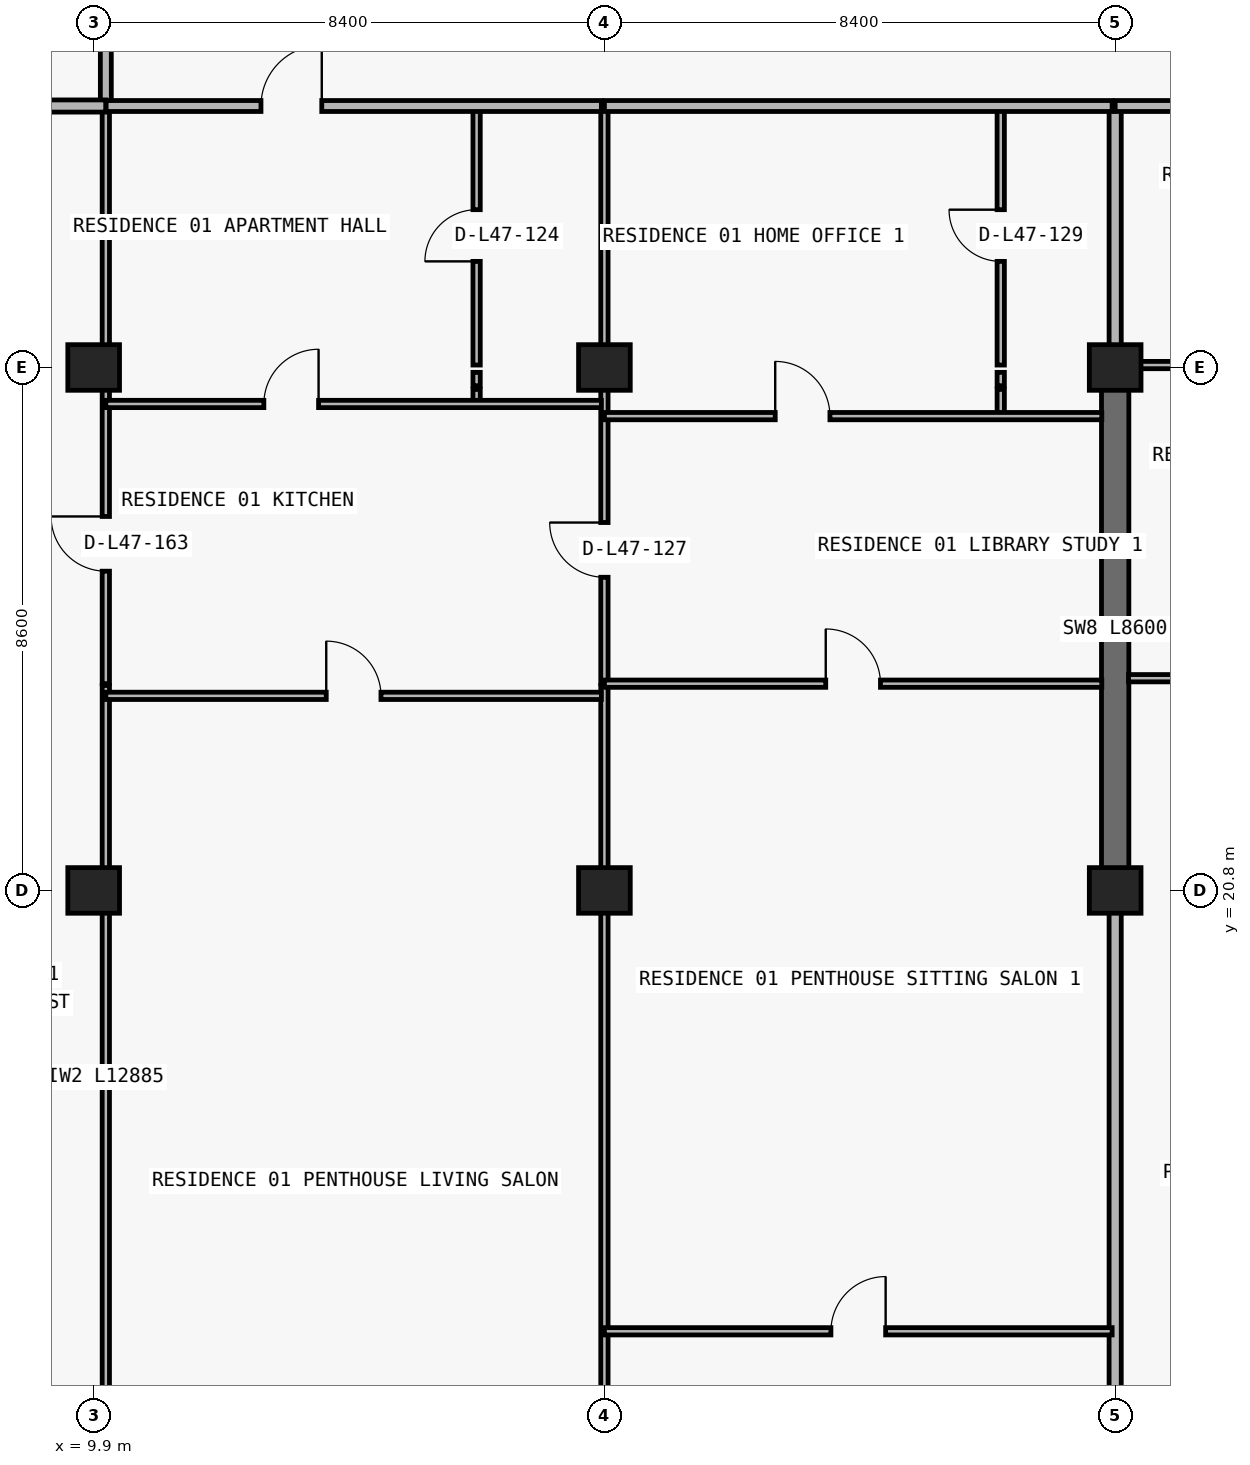
"""IFC4 building model, lengths in metres.
Left out: names, types, materials, properties, quantities, classifications, styles, units other than length and angle.
Written with IfcOpenShell. Run it as: python <this file> out.ifc"""

import sys

from ifc_helpers import new_model, si_unit, direction, frame, frame_2d, origin, origin_2d, place, context, subcontext, project, spatial, rectangle, extrude, element, fill, save


model = new_model("IFC4")
c1 = context("Model", 3, precision=1e-05, world=origin(), true_north=direction((0.0, 1.0)))
c2 = subcontext(c1, "Body", "Model", "MODEL_VIEW")
j1 = project(units=[si_unit("LENGTHUNIT", "METRE"), si_unit("PLANEANGLEUNIT", "RADIAN")], contexts=[c1])
p1 = place(None, origin())
s1 = spatial("IfcSite", under=j1, at=p1, CompositionType="ELEMENT")
p2 = place(p1, origin())
s2 = spatial("IfcBuilding", under=s1, at=p2, CompositionType="ELEMENT")
p3 = place(p2, frame((0.0, 0.0, 170.4)))
s3 = spatial("IfcBuildingStorey", under=s2, at=p3, CompositionType="ELEMENT", Elevation=170.4)
for number, where, z_axis, x_axis in (
    (1, (9.9, 20.8, 0.0), (0.0, 0.0, 1.0), (1.0, 0.0, 0.0)),
    (2, (18.3, 20.8, 0.0), (0.0, 0.0, 1.0), (1.0, 0.0, 0.0)),
    (3, (26.7, 20.8, 0.0), (0.0, 0.0, 1.0), (1.0, 0.0, 0.0)),
    (4, (9.9, 29.4, 0.0), (0.0, 0.0, 1.0), (1.0, 0.0, 0.0)),
    (5, (18.3, 29.4, 0.0), (0.0, 0.0, 1.0), (1.0, 0.0, 0.0)),
    (6, (26.7, 29.4, 0.0), (0.0, 0.0, 1.0), (1.0, 0.0, 0.0)),
):
    element("IfcColumn", number, at=place(p3, frame(where, z_axis=z_axis, x_axis=x_axis)), inside=s3, PredefinedType="COLUMN", context=c2, shape_type="SweptSolid", body=[
        extrude(rectangle(XDim=0.85, YDim=0.75, at=origin_2d()), origin(), (0.0, 0.0, 1.0), 3.05),
    ])
p4 = place(p3, frame((26.7, 20.8, 0.0), z_axis=(0.0, 0.0, 1.0), x_axis=(0.0, 1.0, 0.0)))
e7 = element("IfcWall", 7, at=p4, inside=s3, PredefinedType="SHEAR", context=c2, shape_type="SweptSolid", body=[
    extrude(rectangle(XDim=8.6, YDim=0.45, at=frame_2d((4.3, 0.0))), origin(), (0.0, 0.0, 1.0), 3.05),
])
p5 = place(p3, frame((10.1, 11.285, 0.0), z_axis=(0.0, 0.0, 1.0), x_axis=(0.0, 1.0, 0.0)))
e8 = element("IfcWall", 8, at=p5, inside=s3, PredefinedType="PARTITIONING", context=c2, shape_type="SweptSolid", body=[
    extrude(rectangle(XDim=12.885, YDim=0.12, at=frame_2d((6.442, 0.0))), origin(), (0.0, 0.0, 1.0), 2.263),
])
p6 = place(p3, frame((10.1, 24.2, 0.0), z_axis=(0.0, 0.0, 1.0), x_axis=(0.0, 1.0, 0.0)))
e9 = element("IfcWall", 9, at=p6, inside=s3, PredefinedType="PARTITIONING", context=c2, shape_type="SweptSolid", body=[
    extrude(rectangle(XDim=4.84, YDim=0.12, at=frame_2d((2.42, 0.0))), origin(), (0.0, 0.0, 1.0), 2.263),
])
p7 = place(p6, frame((1.85, 0.0, 0.0)))
e10 = element("IfcOpeningElement", 10, at=p7, cuts=e9, PredefinedType="OPENING", context=c2, shape_type="SweptSolid", body=[
    extrude(rectangle(XDim=0.9, YDim=2.15, at=frame_2d((0.45, 1.075))), frame((0.0, 0.07, 0.0), z_axis=(0.0, -1.0, 0.0), x_axis=(1.0, 0.0, 0.0)), (0.0, 0.0, 1.0), 0.14),
])
p8 = place(p3, frame((10.1, 29.1, 0.0), z_axis=(0.0, 0.0, 1.0), x_axis=(0.0, 1.0, 0.0)))
e11 = element("IfcWall", 11, at=p8, inside=s3, PredefinedType="PARTITIONING", context=c2, shape_type="SweptSolid", body=[
    extrude(rectangle(XDim=0.22, YDim=0.12, at=frame_2d((0.11, 0.0))), origin(), (0.0, 0.0, 1.0), 3.05),
])
p9 = place(p3, frame((10.1, 29.44, 0.0), z_axis=(0.0, 0.0, 1.0), x_axis=(0.0, 1.0, 0.0)))
e12 = element("IfcWall", 12, at=p9, inside=s3, PredefinedType="PARTITIONING", context=c2, shape_type="SweptSolid", body=[
    extrude(rectangle(XDim=4.26, YDim=0.12, at=frame_2d((2.13, 0.0))), origin(), (0.0, 0.0, 1.0), 2.263),
])
p10 = place(p3, frame((10.1, 33.705, 0.0), z_axis=(0.0, 0.0, 1.0), x_axis=(0.0, 1.0, 0.0)))
e13 = element("IfcWall", 13, at=p10, inside=s3, PredefinedType="PARTITIONING", context=c2, shape_type="SweptSolid", body=[
    extrude(rectangle(XDim=3.245, YDim=0.18, at=frame_2d((1.623, 0.0))), origin(), (0.0, 0.0, 1.0), 2.263),
])
p11 = place(p3, frame((16.198, 28.8, 0.0), z_axis=(0.0, 0.0, 1.0), x_axis=(0.0, 1.0, 0.0)))
e14 = element("IfcWall", 14, at=p11, inside=s3, PredefinedType="PARTITIONING", context=c2, shape_type="SweptSolid", body=[
    extrude(rectangle(XDim=0.24, YDim=0.12, at=frame_2d((0.12, 0.0))), origin(), (0.0, 0.0, 1.0), 3.05),
])
p12 = place(p3, frame((16.198, 29.1, 0.0), z_axis=(0.0, 0.0, 1.0), x_axis=(0.0, 1.0, 0.0)))
e15 = element("IfcWall", 15, at=p12, inside=s3, PredefinedType="PARTITIONING", context=c2, shape_type="SweptSolid", body=[
    extrude(rectangle(XDim=0.22, YDim=0.12, at=frame_2d((0.11, 0.0))), origin(), (0.0, 0.0, 1.0), 3.05),
])
p13 = place(p3, frame((16.198, 29.44, 0.0), z_axis=(0.0, 0.0, 1.0), x_axis=(0.0, 1.0, 0.0)))
e16 = element("IfcWall", 16, at=p13, inside=s3, PredefinedType="PARTITIONING", context=c2, shape_type="SweptSolid", body=[
    extrude(rectangle(XDim=4.26, YDim=0.12, at=frame_2d((2.13, 0.0))), origin(), (0.0, 0.0, 1.0), 3.05),
])
p14 = place(p13, frame((1.705, 0.0, 0.0)))
e17 = element("IfcOpeningElement", 17, at=p14, cuts=e16, PredefinedType="OPENING", context=c2, shape_type="SweptSolid", body=[
    extrude(rectangle(XDim=0.85, YDim=2.1, at=frame_2d((0.425, 1.05))), frame((0.0, 0.07, 0.0), z_axis=(0.0, -1.0, 0.0), x_axis=(1.0, 0.0, 0.0)), (0.0, 0.0, 1.0), 0.14),
])
p15 = place(p3, frame((18.3, 11.24, 0.0), z_axis=(0.0, 0.0, 1.0), x_axis=(0.0, 1.0, 0.0)))
e18 = element("IfcWall", 18, at=p15, inside=s3, PredefinedType="PARTITIONING", context=c2, shape_type="SweptSolid", body=[
    extrude(rectangle(XDim=12.93, YDim=0.12, at=frame_2d((6.465, 0.0))), origin(), (0.0, 0.0, 1.0), 2.263),
])
p16 = place(p3, frame((18.3, 24.2, 0.0), z_axis=(0.0, 0.0, 1.0), x_axis=(0.0, 1.0, 0.0)))
e19 = element("IfcWall", 19, at=p16, inside=s3, PredefinedType="PARTITIONING", context=c2, shape_type="SweptSolid", body=[
    extrude(rectangle(XDim=4.84, YDim=0.12, at=frame_2d((2.42, 0.0))), origin(), (0.0, 0.0, 1.0), 2.263),
])
p17 = place(p16, frame((1.75, 0.0, 0.0)))
e20 = element("IfcOpeningElement", 20, at=p17, cuts=e19, PredefinedType="OPENING", context=c2, shape_type="SweptSolid", body=[
    extrude(rectangle(XDim=0.9, YDim=2.15, at=frame_2d((0.45, 1.075))), frame((0.0, 0.07, 0.0), z_axis=(0.0, -1.0, 0.0), x_axis=(1.0, 0.0, 0.0)), (0.0, 0.0, 1.0), 0.14),
])
p18 = place(p3, frame((18.3, 29.1, 0.0), z_axis=(0.0, 0.0, 1.0), x_axis=(0.0, 1.0, 0.0)))
e21 = element("IfcWall", 21, at=p18, inside=s3, PredefinedType="PARTITIONING", context=c2, shape_type="SweptSolid", body=[
    extrude(rectangle(XDim=0.22, YDim=0.12, at=frame_2d((0.11, 0.0))), origin(), (0.0, 0.0, 1.0), 3.05),
])
p19 = place(p3, frame((18.3, 29.44, 0.0), z_axis=(0.0, 0.0, 1.0), x_axis=(0.0, 1.0, 0.0)))
e22 = element("IfcWall", 22, at=p19, inside=s3, PredefinedType="PARTITIONING", context=c2, shape_type="SweptSolid", body=[
    extrude(rectangle(XDim=4.26, YDim=0.12, at=frame_2d((2.13, 0.0))), origin(), (0.0, 0.0, 1.0), 2.263),
])
p20 = place(p3, frame((24.818, 28.6, 0.0), z_axis=(0.0, 0.0, 1.0), x_axis=(0.0, 1.0, 0.0)))
e23 = element("IfcWall", 23, at=p20, inside=s3, PredefinedType="PARTITIONING", context=c2, shape_type="SweptSolid", body=[
    extrude(rectangle(XDim=0.44, YDim=0.12, at=frame_2d((0.22, 0.0))), origin(), (0.0, 0.0, 1.0), 3.05),
])
p21 = place(p3, frame((24.818, 29.1, 0.0), z_axis=(0.0, 0.0, 1.0), x_axis=(0.0, 1.0, 0.0)))
e24 = element("IfcWall", 24, at=p21, inside=s3, PredefinedType="PARTITIONING", context=c2, shape_type="SweptSolid", body=[
    extrude(rectangle(XDim=0.22, YDim=0.12, at=frame_2d((0.11, 0.0))), origin(), (0.0, 0.0, 1.0), 3.05),
])
p22 = place(p3, frame((24.818, 29.44, 0.0), z_axis=(0.0, 0.0, 1.0), x_axis=(0.0, 1.0, 0.0)))
e25 = element("IfcWall", 25, at=p22, inside=s3, PredefinedType="PARTITIONING", context=c2, shape_type="SweptSolid", body=[
    extrude(rectangle(XDim=4.26, YDim=0.12, at=frame_2d((2.13, 0.0))), origin(), (0.0, 0.0, 1.0), 3.05),
])
p23 = place(p22, frame((1.705, 0.0, 0.0)))
e26 = element("IfcOpeningElement", 26, at=p23, cuts=e25, PredefinedType="OPENING", context=c2, shape_type="SweptSolid", body=[
    extrude(rectangle(XDim=0.85, YDim=2.1, at=frame_2d((0.425, 1.05))), frame((0.0, 0.07, 0.0), z_axis=(0.0, -1.0, 0.0), x_axis=(1.0, 0.0, 0.0)), (0.0, 0.0, 1.0), 0.14),
])
p24 = place(p3, frame((26.7, 11.24, 0.0), z_axis=(0.0, 0.0, 1.0), x_axis=(0.0, 1.0, 0.0)))
e27 = element("IfcWall", 27, at=p24, inside=s3, PredefinedType="PARTITIONING", context=c2, shape_type="SweptSolid", body=[
    extrude(rectangle(XDim=9.555, YDim=0.2, at=frame_2d((4.777, 0.0))), origin(), (0.0, 0.0, 1.0), 2.263),
])
p25 = place(p3, frame((26.7, 29.44, 0.0), z_axis=(0.0, 0.0, 1.0), x_axis=(0.0, 1.0, 0.0)))
e28 = element("IfcWall", 28, at=p25, inside=s3, PredefinedType="PARTITIONING", context=c2, shape_type="SweptSolid", body=[
    extrude(rectangle(XDim=4.26, YDim=0.2, at=frame_2d((2.13, 0.0))), origin(), (0.0, 0.0, 1.0), 2.335),
])
p26 = place(p3, frame((18.3, 13.55, 0.0), z_axis=(0.0, 0.0, 1.0), x_axis=(1.0, 0.0, 0.0)))
e29 = element("IfcWall", 29, at=p26, inside=s3, PredefinedType="PARTITIONING", context=c2, shape_type="SweptSolid", body=[
    extrude(rectangle(XDim=8.35, YDim=0.12, at=frame_2d((4.175, 0.0))), origin(), (0.0, 0.0, 1.0), 3.05),
])
p27 = place(p26, frame((3.725, 0.0, 0.0)))
e30 = element("IfcOpeningElement", 30, at=p27, cuts=e29, PredefinedType="OPENING", context=c2, shape_type="SweptSolid", body=[
    extrude(rectangle(XDim=0.9, YDim=2.15, at=frame_2d((0.45, 1.075))), frame((0.0, 0.07, 0.0), z_axis=(0.0, -1.0, 0.0), x_axis=(1.0, 0.0, 0.0)), (0.0, 0.0, 1.0), 0.14),
])
p28 = place(p3, frame((10.1, 24.0, 0.0), z_axis=(0.0, 0.0, 1.0), x_axis=(1.0, 0.0, 0.0)))
e31 = element("IfcWall", 31, at=p28, inside=s3, PredefinedType="PARTITIONING", context=c2, shape_type="SweptSolid", body=[
    extrude(rectangle(XDim=8.15, YDim=0.12, at=frame_2d((4.075, 0.0))), origin(), (0.0, 0.0, 1.0), 3.05),
])
p29 = place(p28, frame((3.625, 0.0, 0.0)))
e32 = element("IfcOpeningElement", 32, at=p29, cuts=e31, PredefinedType="OPENING", context=c2, shape_type="SweptSolid", body=[
    extrude(rectangle(XDim=0.9, YDim=2.15, at=frame_2d((0.45, 1.075))), frame((0.0, 0.07, 0.0), z_axis=(0.0, -1.0, 0.0), x_axis=(1.0, 0.0, 0.0)), (0.0, 0.0, 1.0), 0.14),
])
p30 = place(p3, frame((18.3, 24.2, 0.0), z_axis=(0.0, 0.0, 1.0), x_axis=(1.0, 0.0, 0.0)))
e33 = element("IfcWall", 33, at=p30, inside=s3, PredefinedType="PARTITIONING", context=c2, shape_type="SweptSolid", body=[
    extrude(rectangle(XDim=8.18, YDim=0.12, at=frame_2d((4.09, 0.0))), origin(), (0.0, 0.0, 1.0), 3.05),
])
p31 = place(p30, frame((3.64, 0.0, 0.0)))
e34 = element("IfcOpeningElement", 34, at=p31, cuts=e33, PredefinedType="OPENING", context=c2, shape_type="SweptSolid", body=[
    extrude(rectangle(XDim=0.9, YDim=2.15, at=frame_2d((0.45, 1.075))), frame((0.0, 0.07, 0.0), z_axis=(0.0, -1.0, 0.0), x_axis=(1.0, 0.0, 0.0)), (0.0, 0.0, 1.0), 0.14),
])
p32 = place(p3, frame((26.92, 24.29, 0.0), z_axis=(0.0, 0.0, 1.0), x_axis=(1.0, 0.0, 0.0)))
e35 = element("IfcWall", 35, at=p32, inside=s3, PredefinedType="PARTITIONING", context=c2, shape_type="SweptSolid", body=[
    extrude(rectangle(XDim=4.4, YDim=0.12, at=frame_2d((2.2, 0.0))), origin(), (0.0, 0.0, 1.0), 3.05),
])
p33 = place(p32, frame((1.583, 0.0, 0.0)))
e36 = element("IfcOpeningElement", 36, at=p33, cuts=e35, PredefinedType="OPENING", context=c2, shape_type="SweptSolid", body=[
    extrude(rectangle(XDim=0.9, YDim=2.15, at=frame_2d((0.45, 1.075))), frame((0.0, 0.07, 0.0), z_axis=(0.0, -1.0, 0.0), x_axis=(1.0, 0.0, 0.0)), (0.0, 0.0, 1.0), 0.14),
])
p34 = place(p3, frame((18.3, 28.6, 0.0), z_axis=(0.0, 0.0, 1.0), x_axis=(1.0, 0.0, 0.0)))
e37 = element("IfcWall", 37, at=p34, inside=s3, PredefinedType="PARTITIONING", context=c2, shape_type="SweptSolid", body=[
    extrude(rectangle(XDim=8.18, YDim=0.12, at=frame_2d((4.09, 0.0))), origin(), (0.0, 0.0, 1.0), 3.05),
])
p35 = place(p34, frame((2.809, 0.0, 0.0)))
e38 = element("IfcOpeningElement", 38, at=p35, cuts=e37, PredefinedType="OPENING", context=c2, shape_type="SweptSolid", body=[
    extrude(rectangle(XDim=0.9, YDim=2.15, at=frame_2d((0.45, 1.075))), frame((0.0, 0.07, 0.0), z_axis=(0.0, -1.0, 0.0), x_axis=(1.0, 0.0, 0.0)), (0.0, 0.0, 1.0), 0.14),
])
p36 = place(p3, frame((10.1, 28.8, 0.0), z_axis=(0.0, 0.0, 1.0), x_axis=(1.0, 0.0, 0.0)))
e39 = element("IfcWall", 39, at=p36, inside=s3, PredefinedType="PARTITIONING", context=c2, shape_type="SweptSolid", body=[
    extrude(rectangle(XDim=8.15, YDim=0.12, at=frame_2d((4.075, 0.0))), origin(), (0.0, 0.0, 1.0), 3.05),
])
p37 = place(p36, frame((2.599, 0.0, 0.0)))
e40 = element("IfcOpeningElement", 40, at=p37, cuts=e39, PredefinedType="OPENING", context=c2, shape_type="SweptSolid", body=[
    extrude(rectangle(XDim=0.9, YDim=2.15, at=frame_2d((0.45, 1.075))), frame((0.0, 0.07, 0.0), z_axis=(0.0, -1.0, 0.0), x_axis=(1.0, 0.0, 0.0)), (0.0, 0.0, 1.0), 0.14),
])
p38 = place(p3, frame((26.92, 29.44, 0.0), z_axis=(0.0, 0.0, 1.0), x_axis=(1.0, 0.0, 0.0)))
e41 = element("IfcWall", 41, at=p38, inside=s3, PredefinedType="PARTITIONING", context=c2, shape_type="SweptSolid", body=[
    extrude(rectangle(XDim=4.4, YDim=0.12, at=frame_2d((2.2, 0.0))), origin(), (0.0, 0.0, 1.0), 2.263),
])
p39 = place(p38, frame((1.583, 0.0, 0.0)))
e42 = element("IfcOpeningElement", 42, at=p39, cuts=e41, PredefinedType="OPENING", context=c2, shape_type="SweptSolid", body=[
    extrude(rectangle(XDim=0.9, YDim=2.15, at=frame_2d((0.45, 1.075))), frame((0.0, 0.07, 0.0), z_axis=(0.0, -1.0, 0.0), x_axis=(1.0, 0.0, 0.0)), (0.0, 0.0, 1.0), 0.14),
])
p40 = place(p3, frame((6.395, 33.7, 0.0), z_axis=(0.0, 0.0, 1.0), x_axis=(1.0, 0.0, 0.0)))
e43 = element("IfcWall", 43, at=p40, inside=s3, PredefinedType="PARTITIONING", context=c2, shape_type="SweptSolid", body=[
    extrude(rectangle(XDim=3.705, YDim=0.2, at=frame_2d((1.853, 0.0))), origin(), (0.0, 0.0, 1.0), 3.05),
])
p41 = place(p3, frame((10.105, 33.7, 0.0), z_axis=(0.0, 0.0, 1.0), x_axis=(1.0, 0.0, 0.0)))
e44 = element("IfcWall", 44, at=p41, inside=s3, PredefinedType="PARTITIONING", context=c2, shape_type="SweptSolid", body=[
    extrude(rectangle(XDim=8.145, YDim=0.18, at=frame_2d((4.073, 0.0))), origin(), (0.0, 0.0, 1.0), 3.05),
])
p42 = place(p41, frame((2.546, 0.0, 0.0)))
e45 = element("IfcOpeningElement", 45, at=p42, cuts=e44, PredefinedType="OPENING", context=c2, shape_type="SweptSolid", body=[
    extrude(rectangle(XDim=1.0, YDim=2.2, at=frame_2d((0.5, 1.1))), frame((0.0, 0.1, 0.0), z_axis=(0.0, -1.0, 0.0), x_axis=(1.0, 0.0, 0.0)), (0.0, 0.0, 1.0), 0.2),
])
p43 = place(p3, frame((18.3, 33.7, 0.0), z_axis=(0.0, 0.0, 1.0), x_axis=(1.0, 0.0, 0.0)))
e46 = element("IfcWall", 46, at=p43, inside=s3, PredefinedType="PARTITIONING", context=c2, shape_type="SweptSolid", body=[
    extrude(rectangle(XDim=8.35, YDim=0.18, at=frame_2d((4.175, 0.0))), origin(), (0.0, 0.0, 1.0), 3.05),
])
p44 = place(p3, frame((26.7, 33.7, 0.0), z_axis=(0.0, 0.0, 1.0), x_axis=(1.0, 0.0, 0.0)))
e47 = element("IfcWall", 47, at=p44, inside=s3, PredefinedType="PARTITIONING", context=c2, shape_type="SweptSolid", body=[
    extrude(rectangle(XDim=4.62, YDim=0.18, at=frame_2d((2.31, 0.0))), origin(), (0.0, 0.0, 1.0), 3.05),
])
p45 = place(p44, frame((1.81, 0.0, 0.0)))
e48 = element("IfcOpeningElement", 48, at=p45, cuts=e47, PredefinedType="OPENING", context=c2, shape_type="SweptSolid", body=[
    extrude(rectangle(XDim=1.0, YDim=2.2, at=frame_2d((0.5, 1.1))), frame((0.0, 0.1, 0.0), z_axis=(0.0, -1.0, 0.0), x_axis=(1.0, 0.0, 0.0)), (0.0, 0.0, 1.0), 0.2),
])
p46 = place(p42, origin())
e49 = element("IfcDoor", 49, at=p46, inside=s3, OperationType="SINGLE_SWING_RIGHT", PredefinedType="DOOR", context=c2, shape_type="SweptSolid", body=[
    extrude(rectangle(XDim=1.0, YDim=2.2, at=frame_2d((0.5, 1.1))), frame((0.0, 0.025, 0.0), z_axis=(0.0, -1.0, 0.0), x_axis=(1.0, 0.0, 0.0)), (0.0, 0.0, 1.0), 0.05),
])
fill(e45, e49)
p47 = place(p14, origin())
e50 = element("IfcDoor", 50, at=p47, inside=s3, OperationType="SINGLE_SWING_LEFT", PredefinedType="DOOR", context=c2, shape_type="SweptSolid", body=[
    extrude(rectangle(XDim=0.85, YDim=2.1, at=frame_2d((0.425, 1.05))), frame((0.0, 0.025, 0.0), z_axis=(0.0, -1.0, 0.0), x_axis=(1.0, 0.0, 0.0)), (0.0, 0.0, 1.0), 0.05),
])
fill(e17, e50)
p48 = place(p37, origin())
e51 = element("IfcDoor", 51, at=p48, inside=s3, OperationType="SINGLE_SWING_RIGHT", PredefinedType="DOOR", context=c2, shape_type="SweptSolid", body=[
    extrude(rectangle(XDim=0.9, YDim=2.15, at=frame_2d((0.45, 1.075))), frame((0.0, 0.025, 0.0), z_axis=(0.0, -1.0, 0.0), x_axis=(1.0, 0.0, 0.0)), (0.0, 0.0, 1.0), 0.05),
])
fill(e40, e51)
p49 = place(p29, origin())
e52 = element("IfcDoor", 52, at=p49, inside=s3, OperationType="SINGLE_SWING_LEFT", PredefinedType="DOOR", context=c2, shape_type="SweptSolid", body=[
    extrude(rectangle(XDim=0.9, YDim=2.15, at=frame_2d((0.45, 1.075))), frame((0.0, 0.025, 0.0), z_axis=(0.0, -1.0, 0.0), x_axis=(1.0, 0.0, 0.0)), (0.0, 0.0, 1.0), 0.05),
])
fill(e32, e52)
p50 = place(p17, origin())
e53 = element("IfcDoor", 53, at=p50, inside=s3, OperationType="SINGLE_SWING_RIGHT", PredefinedType="DOOR", context=c2, shape_type="SweptSolid", body=[
    extrude(rectangle(XDim=0.9, YDim=2.15, at=frame_2d((0.45, 1.075))), frame((0.0, 0.025, 0.0), z_axis=(0.0, -1.0, 0.0), x_axis=(1.0, 0.0, 0.0)), (0.0, 0.0, 1.0), 0.05),
])
fill(e20, e53)
p51 = place(p35, origin())
e54 = element("IfcDoor", 54, at=p51, inside=s3, OperationType="SINGLE_SWING_LEFT", PredefinedType="DOOR", context=c2, shape_type="SweptSolid", body=[
    extrude(rectangle(XDim=0.9, YDim=2.15, at=frame_2d((0.45, 1.075))), frame((0.0, 0.025, 0.0), z_axis=(0.0, -1.0, 0.0), x_axis=(1.0, 0.0, 0.0)), (0.0, 0.0, 1.0), 0.05),
])
fill(e38, e54)
p52 = place(p23, origin())
e55 = element("IfcDoor", 55, at=p52, inside=s3, OperationType="SINGLE_SWING_RIGHT", PredefinedType="DOOR", context=c2, shape_type="SweptSolid", body=[
    extrude(rectangle(XDim=0.85, YDim=2.1, at=frame_2d((0.425, 1.05))), frame((0.0, 0.025, 0.0), z_axis=(0.0, -1.0, 0.0), x_axis=(1.0, 0.0, 0.0)), (0.0, 0.0, 1.0), 0.05),
])
fill(e26, e55)
p53 = place(p31, origin())
e56 = element("IfcDoor", 56, at=p53, inside=s3, OperationType="SINGLE_SWING_LEFT", PredefinedType="DOOR", context=c2, shape_type="SweptSolid", body=[
    extrude(rectangle(XDim=0.9, YDim=2.15, at=frame_2d((0.45, 1.075))), frame((0.0, 0.025, 0.0), z_axis=(0.0, -1.0, 0.0), x_axis=(1.0, 0.0, 0.0)), (0.0, 0.0, 1.0), 0.05),
])
fill(e34, e56)
p54 = place(p27, origin())
e57 = element("IfcDoor", 57, at=p54, inside=s3, OperationType="SINGLE_SWING_RIGHT", PredefinedType="DOOR", context=c2, shape_type="SweptSolid", body=[
    extrude(rectangle(XDim=0.9, YDim=2.15, at=frame_2d((0.45, 1.075))), frame((0.0, 0.025, 0.0), z_axis=(0.0, -1.0, 0.0), x_axis=(1.0, 0.0, 0.0)), (0.0, 0.0, 1.0), 0.05),
])
fill(e30, e57)
p55 = place(p7, origin())
e58 = element("IfcDoor", 58, at=p55, inside=s3, OperationType="SINGLE_SWING_RIGHT", PredefinedType="DOOR", context=c2, shape_type="SweptSolid", body=[
    extrude(rectangle(XDim=0.9, YDim=2.15, at=frame_2d((0.45, 1.075))), frame((0.0, 0.025, 0.0), z_axis=(0.0, -1.0, 0.0), x_axis=(1.0, 0.0, 0.0)), (0.0, 0.0, 1.0), 0.05),
])
fill(e10, e58)
save(model, sys.argv[1])
